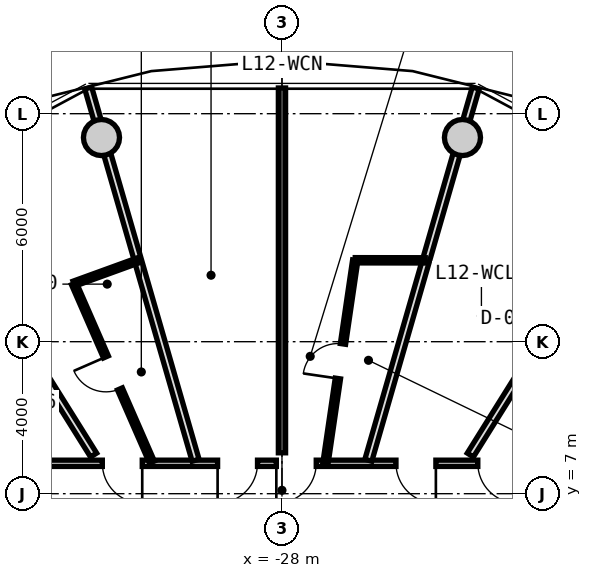
"""IFC4 building model, lengths in metres.
Left out: names, types, materials, properties, quantities, classifications, styles, units other than length and angle.
Written with IfcOpenShell. Run it as: python <this file> out.ifc"""

import sys

from ifc_helpers import new_model, si_unit, direction, frame, frame_2d, origin, origin_2d, place, context, subcontext, project, spatial, rectangle, circle, extrude, source, transform, mapped, element, fill, save


model = new_model("IFC4")
c1 = context("Model", 3, precision=1e-05, world=origin(), true_north=direction((0.0, 1.0)))
c2 = subcontext(c1, "Body", "Model", "MODEL_VIEW")
j1 = project(units=[si_unit("LENGTHUNIT", "METRE"), si_unit("PLANEANGLEUNIT", "RADIAN")], contexts=[c1])
p1 = place(None, origin())
s1 = spatial("IfcSite", under=j1, at=p1, CompositionType="ELEMENT")
p2 = place(p1, origin())
s2 = spatial("IfcBuilding", under=s1, at=p2, CompositionType="ELEMENT")
p3 = place(p2, frame((0.0, 0.0, 42.95)))
s3 = spatial("IfcBuildingStorey", under=s2, at=p3, CompositionType="ELEMENT", Elevation=42.95)
m1 = source(origin(), c2, "Body", "SweptSolid", [
    extrude(circle(Radius=0.475, at=origin_2d()), origin(), (0.0, 0.0, 1.0), 3.05),
])
for number, where, z_axis, x_axis in (
    (1, (-23.251, 16.373, 0.0), (0.0, 0.0, 1.0), (1.0, 0.0, 0.0)),
    (2, (-32.749, 16.373, 0.0), (0.0, 0.0, 1.0), (1.0, 0.0, 0.0)),
):
    element("IfcColumn", number, at=place(p3, frame(where, z_axis=z_axis, x_axis=x_axis)), inside=s3, PredefinedType="COLUMN", context=c2, shape_type="MappedRepresentation", body=[
        mapped(m1, transform((0.0, 0.0, 0.0), x_axis=(1.0, 0.0, 0.0), y_axis=(0.0, 1.0, 0.0), z_axis=(0.0, 0.0, 1.0), scale=1.0)),
    ])
m2 = source(origin(), c2, "Body", "SweptSolid", [
    extrude(rectangle(XDim=19.0, YDim=0.165, at=frame_2d((9.5, 0.0))), origin(), (0.0, 0.0, 1.0), 2.775),
])
p4 = place(p3, frame((-37.5, 7.8, 0.0), z_axis=(0.0, 0.0, 1.0), x_axis=(1.0, 0.0, 0.0)))
e3 = element("IfcWall", 3, at=p4, inside=s3, PredefinedType="PARTITIONING", context=c2, shape_type="MappedRepresentation", body=[
    mapped(m2, transform((0.0, 0.0, 0.0), x_axis=(1.0, 0.0, 0.0), y_axis=(0.0, 1.0, 0.0), z_axis=(0.0, 0.0, 1.0), scale=1.0)),
])
p5 = place(p4, frame((4.773, 0.0, 0.0)))
e4 = element("IfcOpeningElement", 4, at=p5, cuts=e3, PredefinedType="OPENING", context=c2, shape_type="SweptSolid", body=[
    extrude(rectangle(XDim=1.05, YDim=2.15, at=frame_2d((0.525, 1.075))), frame((0.0, 0.093, 0.0), z_axis=(0.0, -1.0, 0.0), x_axis=(1.0, 0.0, 0.0)), (0.0, 0.0, 1.0), 0.185),
])
p6 = place(p4, frame((2.251, 0.0, 0.0)))
e5 = element("IfcOpeningElement", 5, at=p6, cuts=e3, PredefinedType="OPENING", context=c2, shape_type="SweptSolid", body=[
    extrude(rectangle(XDim=1.05, YDim=2.15, at=frame_2d((0.525, 1.075))), frame((0.0, 0.093, 0.0), z_axis=(0.0, -1.0, 0.0), x_axis=(1.0, 0.0, 0.0)), (0.0, 0.0, 1.0), 0.185),
])
p7 = place(p4, frame((14.653, 0.0, 0.0)))
e6 = element("IfcOpeningElement", 6, at=p7, cuts=e3, PredefinedType="OPENING", context=c2, shape_type="SweptSolid", body=[
    extrude(rectangle(XDim=1.05, YDim=2.15, at=frame_2d((0.525, 1.075))), frame((0.0, 0.093, 0.0), z_axis=(0.0, -1.0, 0.0), x_axis=(1.0, 0.0, 0.0)), (0.0, 0.0, 1.0), 0.185),
])
p8 = place(p4, frame((12.5, 0.0, 0.0)))
e7 = element("IfcOpeningElement", 7, at=p8, cuts=e3, PredefinedType="OPENING", context=c2, shape_type="SweptSolid", body=[
    extrude(rectangle(XDim=1.05, YDim=2.15, at=frame_2d((0.525, 1.075))), frame((0.0, 0.093, 0.0), z_axis=(0.0, -1.0, 0.0), x_axis=(1.0, 0.0, 0.0)), (0.0, 0.0, 1.0), 0.185),
])
p9 = place(p4, frame((9.352, 0.0, 0.0)))
e8 = element("IfcOpeningElement", 8, at=p9, cuts=e3, PredefinedType="OPENING", context=c2, shape_type="SweptSolid", body=[
    extrude(rectangle(XDim=1.05, YDim=2.15, at=frame_2d((0.525, 1.075))), frame((0.0, 0.093, 0.0), z_axis=(0.0, -1.0, 0.0), x_axis=(1.0, 0.0, 0.0)), (0.0, 0.0, 1.0), 0.185),
])
p10 = place(p4, frame((7.806, 0.0, 0.0)))
e9 = element("IfcOpeningElement", 9, at=p10, cuts=e3, PredefinedType="OPENING", context=c2, shape_type="SweptSolid", body=[
    extrude(rectangle(XDim=1.05, YDim=2.15, at=frame_2d((0.525, 1.075))), frame((0.0, 0.093, 0.0), z_axis=(0.0, -1.0, 0.0), x_axis=(1.0, 0.0, 0.0)), (0.0, 0.0, 1.0), 0.185),
])
m3 = source(origin(), c2, "Body", "SweptSolid", [
    extrude(rectangle(XDim=10.196, YDim=0.19, at=frame_2d((5.098, 0.0))), origin(), (0.0, 0.0, 1.0), 2.225),
])
p11 = place(p3, frame((-30.273, 7.88, 0.0), z_axis=(0.0, 0.0, 1.0), x_axis=(-0.277136420347, 0.960830580549, 0.0)))
e10 = element("IfcWall", 10, at=p11, inside=s3, PredefinedType="PARTITIONING", context=c2, shape_type="MappedRepresentation", body=[
    mapped(m3, transform((0.0, 0.0, 0.0), x_axis=(1.0, 0.0, 0.0), y_axis=(0.0, 1.0, 0.0), z_axis=(0.0, 0.0, 1.0), scale=1.0)),
])
m4 = source(origin(), c2, "Body", "SweptSolid", [
    extrude(rectangle(XDim=8.598, YDim=0.19, at=frame_2d((4.299, 0.0))), origin(), (0.0, 0.0, 1.0), 2.775),
])
p12 = place(p3, frame((-32.957, 8.017, 0.0), z_axis=(0.0, 0.0, 1.0), x_axis=(-0.530039776395, 0.847972779893, 0.0)))
e11 = element("IfcWall", 11, at=p12, inside=s3, PredefinedType="PARTITIONING", context=c2, shape_type="MappedRepresentation", body=[
    mapped(m4, transform((0.0, 0.0, 0.0), x_axis=(1.0, 0.0, 0.0), y_axis=(0.0, 1.0, 0.0), z_axis=(0.0, 0.0, 1.0), scale=1.0)),
])
m5 = source(origin(), c2, "Body", "SweptSolid", [
    extrude(rectangle(XDim=5.126, YDim=0.14, at=frame_2d((2.563, 0.0))), origin(), (0.0, 0.0, 1.0), 2.775),
])
p13 = place(p3, frame((-31.422, 7.83, 0.0), z_axis=(0.0, 0.0, 1.0), x_axis=(-0.400473994842, 0.916308124735, 0.0)))
e12 = element("IfcWall", 12, at=p13, inside=s3, PredefinedType="PARTITIONING", context=c2, shape_type="MappedRepresentation", body=[
    mapped(m5, transform((0.0, 0.0, 0.0), x_axis=(1.0, 0.0, 0.0), y_axis=(0.0, 1.0, 0.0), z_axis=(0.0, 0.0, 1.0), scale=1.0)),
])
p14 = place(p13, frame((2.103, 0.0, 0.0)))
e13 = element("IfcOpeningElement", 13, at=p14, cuts=e12, PredefinedType="OPENING", context=c2, shape_type="SweptSolid", body=[
    extrude(rectangle(XDim=0.92, YDim=2.1, at=frame_2d((0.46, 1.05))), frame((0.0, 0.08, 0.0), z_axis=(0.0, -1.0, 0.0), x_axis=(1.0, 0.0, 0.0)), (0.0, 0.0, 1.0), 0.16),
])
m6 = source(origin(), c2, "Body", "SweptSolid", [
    extrude(rectangle(XDim=1.811, YDim=0.14, at=frame_2d((0.906, 0.0))), origin(), (0.0, 0.0, 1.0), 2.775),
])
p15 = place(p3, frame((-33.475, 12.527, 0.0), z_axis=(0.0, 0.0, 1.0), x_axis=(0.940009682452, 0.341147764021, 0.0)))
e14 = element("IfcWall", 14, at=p15, inside=s3, PredefinedType="PARTITIONING", context=c2, shape_type="MappedRepresentation", body=[
    mapped(m6, transform((0.0, 0.0, 0.0), x_axis=(1.0, 0.0, 0.0), y_axis=(0.0, 1.0, 0.0), z_axis=(0.0, 0.0, 1.0), scale=1.0)),
])
p16 = place(p3, frame((-25.727, 7.88, 0.0), z_axis=(0.0, 0.0, 1.0), x_axis=(0.277136420347, 0.960830580549, 0.0)))
e15 = element("IfcWall", 15, at=p16, inside=s3, PredefinedType="PARTITIONING", context=c2, shape_type="MappedRepresentation", body=[
    mapped(m3, transform((0.0, 0.0, 0.0), x_axis=(1.0, 0.0, 0.0), y_axis=(0.0, 1.0, 0.0), z_axis=(0.0, 0.0, 1.0), scale=1.0)),
])
p17 = place(p3, frame((-23.043, 8.017, 0.0), z_axis=(0.0, 0.0, 1.0), x_axis=(0.530039776395, 0.847972779893, 0.0)))
e16 = element("IfcWall", 16, at=p17, inside=s3, PredefinedType="PARTITIONING", context=c2, shape_type="MappedRepresentation", body=[
    mapped(m4, transform((0.0, 0.0, 0.0), x_axis=(1.0, 0.0, 0.0), y_axis=(0.0, 1.0, 0.0), z_axis=(0.0, 0.0, 1.0), scale=1.0)),
])
m7 = source(origin(), c2, "Body", "SweptSolid", [
    extrude(rectangle(XDim=9.601, YDim=0.19, at=frame_2d((4.8, 0.0))), origin(), (0.0, 0.0, 1.0), 2.775),
])
p18 = place(p3, frame((-28.0, 8.076, 0.0), z_axis=(0.0, 0.0, 1.0), x_axis=(0.0, 1.0, 0.0)))
e17 = element("IfcWall", 17, at=p18, inside=s3, PredefinedType="PARTITIONING", context=c2, shape_type="MappedRepresentation", body=[
    mapped(m7, transform((0.0, 0.0, 0.0), x_axis=(1.0, 0.0, 0.0), y_axis=(0.0, 1.0, 0.0), z_axis=(0.0, 0.0, 1.0), scale=1.0)),
])
m8 = source(origin(), c2, "Body", "SweptSolid", [
    extrude(rectangle(XDim=5.37, YDim=0.14, at=frame_2d((2.685, 0.0))), origin(), (0.0, 0.0, 1.0), 2.775),
])
p19 = place(p3, frame((-26.851, 7.83, 0.0), z_axis=(0.0, 0.0, 1.0), x_axis=(0.145131397853, 0.989412389935, 0.0)))
e18 = element("IfcWall", 18, at=p19, inside=s3, PredefinedType="PARTITIONING", context=c2, shape_type="MappedRepresentation", body=[
    mapped(m8, transform((0.0, 0.0, 0.0), x_axis=(1.0, 0.0, 0.0), y_axis=(0.0, 1.0, 0.0), z_axis=(0.0, 0.0, 1.0), scale=1.0)),
])
p20 = place(p19, frame((2.225, 0.0, 0.0)))
e19 = element("IfcOpeningElement", 19, at=p20, cuts=e18, PredefinedType="OPENING", context=c2, shape_type="SweptSolid", body=[
    extrude(rectangle(XDim=0.92, YDim=2.1, at=frame_2d((0.46, 1.05))), frame((0.0, 0.08, 0.0), z_axis=(0.0, -1.0, 0.0), x_axis=(1.0, 0.0, 0.0)), (0.0, 0.0, 1.0), 0.16),
])
m9 = source(origin(), c2, "Body", "SweptSolid", [
    extrude(rectangle(XDim=1.843, YDim=0.14, at=frame_2d((0.921, 0.0))), origin(), (0.0, 0.0, 1.0), 2.775),
])
p21 = place(p3, frame((-26.072, 13.143, 0.0), z_axis=(0.0, 0.0, 1.0), x_axis=(0.999998937801, -0.001457531246, 0.0)))
e20 = element("IfcWall", 20, at=p21, inside=s3, PredefinedType="PARTITIONING", context=c2, shape_type="MappedRepresentation", body=[
    mapped(m9, transform((0.0, 0.0, 0.0), x_axis=(1.0, 0.0, 0.0), y_axis=(0.0, 1.0, 0.0), z_axis=(0.0, 0.0, 1.0), scale=1.0)),
])
m10 = source(origin(), c2, "Body", "SweptSolid", [
    extrude(rectangle(XDim=1.05, YDim=2.15, at=frame_2d((0.525, 1.075))), frame((0.0, 0.025, 0.0), z_axis=(0.0, -1.0, 0.0), x_axis=(1.0, 0.0, 0.0)), (0.0, 0.0, 1.0), 0.05),
])
p22 = place(p5, frame((1.05, 0.0, 0.0), z_axis=(0.0, 0.0, 1.0), x_axis=(-1.0, 0.0, 0.0)))
e21 = element("IfcDoor", 21, at=p22, inside=s3, OperationType="SINGLE_SWING_LEFT", PredefinedType="DOOR", context=c2, shape_type="MappedRepresentation", body=[
    mapped(m10, transform((0.0, 0.0, 0.0), x_axis=(1.0, 0.0, 0.0), y_axis=(0.0, 1.0, 0.0), z_axis=(0.0, 0.0, 1.0), scale=1.0)),
])
fill(e4, e21)
m11 = source(origin(), c2, "Body", "SweptSolid", [
    extrude(rectangle(XDim=0.92, YDim=2.1, at=frame_2d((0.46, 1.05))), frame((0.0, 0.025, 0.0), z_axis=(0.0, -1.0, 0.0), x_axis=(1.0, 0.0, 0.0)), (0.0, 0.0, 1.0), 0.05),
])
p23 = place(p14, origin())
e22 = element("IfcDoor", 22, at=p23, inside=s3, OperationType="SINGLE_SWING_RIGHT", PredefinedType="DOOR", context=c2, shape_type="MappedRepresentation", body=[
    mapped(m11, transform((0.0, 0.0, 0.0), x_axis=(1.0, 0.0, 0.0), y_axis=(0.0, 1.0, 0.0), z_axis=(0.0, 0.0, 1.0), scale=1.0)),
])
fill(e13, e22)
p24 = place(p7, frame((1.05, 0.0, 0.0), z_axis=(0.0, 0.0, 1.0), x_axis=(-1.0, 0.0, 0.0)))
e23 = element("IfcDoor", 23, at=p24, inside=s3, OperationType="SINGLE_SWING_LEFT", PredefinedType="DOOR", context=c2, shape_type="MappedRepresentation", body=[
    mapped(m10, transform((0.0, 0.0, 0.0), x_axis=(1.0, 0.0, 0.0), y_axis=(0.0, 1.0, 0.0), z_axis=(0.0, 0.0, 1.0), scale=1.0)),
])
fill(e6, e23)
p25 = place(p8, frame((1.05, 0.0, 0.0), z_axis=(0.0, 0.0, 1.0), x_axis=(-1.0, 0.0, 0.0)))
e24 = element("IfcDoor", 24, at=p25, inside=s3, OperationType="SINGLE_SWING_LEFT", PredefinedType="DOOR", context=c2, shape_type="MappedRepresentation", body=[
    mapped(m10, transform((0.0, 0.0, 0.0), x_axis=(1.0, 0.0, 0.0), y_axis=(0.0, 1.0, 0.0), z_axis=(0.0, 0.0, 1.0), scale=1.0)),
])
fill(e7, e24)
p26 = place(p9, frame((1.05, 0.0, 0.0), z_axis=(0.0, 0.0, 1.0), x_axis=(-1.0, 0.0, 0.0)))
e25 = element("IfcDoor", 25, at=p26, inside=s3, OperationType="SINGLE_SWING_RIGHT", PredefinedType="DOOR", context=c2, shape_type="MappedRepresentation", body=[
    mapped(m10, transform((0.0, 0.0, 0.0), x_axis=(1.0, 0.0, 0.0), y_axis=(0.0, 1.0, 0.0), z_axis=(0.0, 0.0, 1.0), scale=1.0)),
])
fill(e8, e25)
p27 = place(p20, origin())
e26 = element("IfcDoor", 26, at=p27, inside=s3, OperationType="SINGLE_SWING_LEFT", PredefinedType="DOOR", context=c2, shape_type="MappedRepresentation", body=[
    mapped(m11, transform((0.0, 0.0, 0.0), x_axis=(1.0, 0.0, 0.0), y_axis=(0.0, 1.0, 0.0), z_axis=(0.0, 0.0, 1.0), scale=1.0)),
])
fill(e19, e26)
p28 = place(p10, frame((1.05, 0.0, 0.0), z_axis=(0.0, 0.0, 1.0), x_axis=(-1.0, 0.0, 0.0)))
e27 = element("IfcDoor", 27, at=p28, inside=s3, OperationType="SINGLE_SWING_RIGHT", PredefinedType="DOOR", context=c2, shape_type="MappedRepresentation", body=[
    mapped(m10, transform((0.0, 0.0, 0.0), x_axis=(1.0, 0.0, 0.0), y_axis=(0.0, 1.0, 0.0), z_axis=(0.0, 0.0, 1.0), scale=1.0)),
])
fill(e9, e27)
save(model, sys.argv[1])
